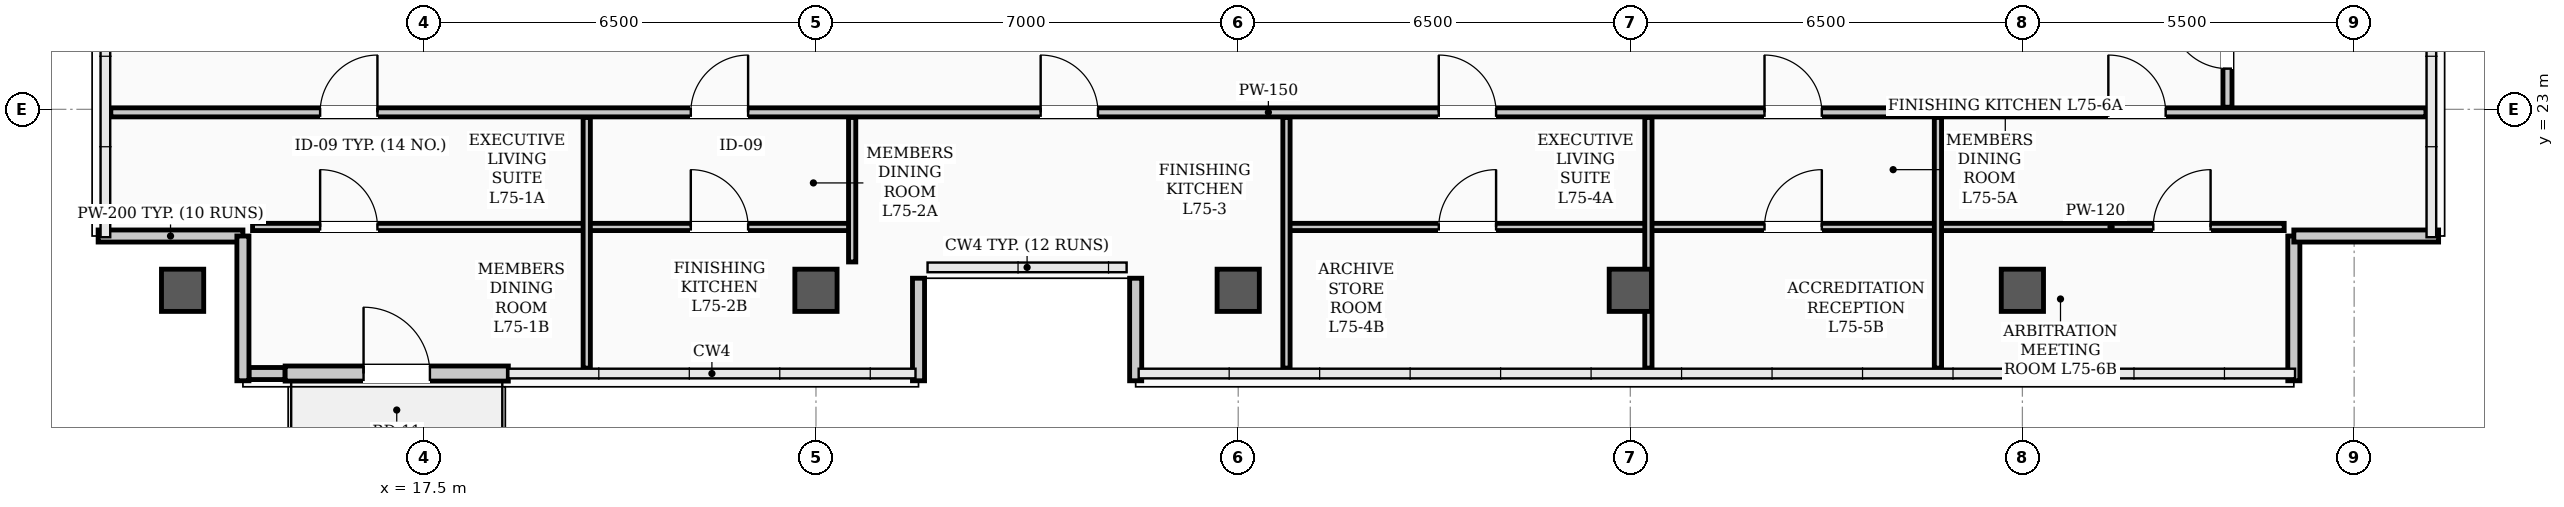
"""IFC4 building model, lengths in metres.
Left out: names, types, materials, properties, quantities, classifications, styles, units other than length and angle.
Written with IfcOpenShell. Run it as: python <this file> out.ifc"""

import sys

from ifc_helpers import new_model, si_unit, direction, frame, frame_2d, origin, origin_2d, place, context, subcontext, project, spatial, rectangle, hollow_rectangle, extrude, element, fill, save


model = new_model("IFC4")
c1 = context("Model", 3, precision=1e-05, world=origin(), true_north=direction((0.0, 1.0)))
c2 = subcontext(c1, "Body", "Model", "MODEL_VIEW")
j1 = project(units=[si_unit("LENGTHUNIT", "METRE"), si_unit("PLANEANGLEUNIT", "RADIAN")], contexts=[c1])
p1 = place(None, origin())
s1 = spatial("IfcSite", under=j1, at=p1, CompositionType="ELEMENT")
p2 = place(p1, origin())
s2 = spatial("IfcBuilding", under=s1, at=p2, CompositionType="ELEMENT")
p3 = place(p2, frame((0.0, 0.0, 300.8)))
s3 = spatial("IfcBuildingStorey", under=s2, at=p3, CompositionType="ELEMENT", Elevation=300.8)
for number, where, z_axis, x_axis in (
    (1, (13.5, 20.0, 0.0), (0.0, 0.0, 1.0), (1.0, 0.0, 0.0)),
    (2, (24.0, 20.0, 0.0), (0.0, 0.0, 1.0), (1.0, 0.0, 0.0)),
    (3, (31.0, 20.0, 0.0), (0.0, 0.0, 1.0), (1.0, 0.0, 0.0)),
    (4, (37.5, 20.0, 0.0), (0.0, 0.0, 1.0), (1.0, 0.0, 0.0)),
    (5, (44.0, 20.0, 0.0), (0.0, 0.0, 1.0), (1.0, 0.0, 0.0)),
):
    element("IfcColumn", number, at=place(p3, frame(where, z_axis=z_axis, x_axis=x_axis)), inside=s3, PredefinedType="COLUMN", context=c2, shape_type="SweptSolid", body=[
        extrude(hollow_rectangle(XDim=0.7, YDim=0.7, WallThickness=0.028, InnerFilletRadius=0.014, OuterFilletRadius=0.042, at=origin_2d()), origin(), (0.0, 0.0, 1.0), 5.2),
    ])
p4 = place(p3, frame((14.6, 18.62, 0.0), z_axis=(0.0, 0.0, 1.0), x_axis=(1.0, 0.0, 0.0)))
e6 = element("IfcWall", 6, at=p4, inside=s3, PredefinedType="PARAPET", context=c2, shape_type="SweptSolid", body=[
    extrude(rectangle(XDim=0.6, YDim=0.2, at=frame_2d((0.3, 0.0))), origin(), (0.0, 0.0, 1.0), 1.2),
])
for number, where, z_axis, x_axis in (
    (7, (12.1, 20.9, 0.0), (0.0, 0.0, 1.0), (1.0, 0.0, 0.0)),
    (8, (14.5, 20.9, 0.0), (0.0, 0.0, 1.0), (0.0, -1.0, 0.0)),
    (9, (48.5, 18.5, 0.0), (0.0, 0.0, 1.0), (0.0, 1.0, 0.0)),
    (10, (48.5, 20.9, 0.0), (0.0, 0.0, 1.0), (1.0, 0.0, 0.0)),
):
    element("IfcWall", number, at=place(p3, frame(where, z_axis=z_axis, x_axis=x_axis)), inside=s3, PredefinedType="PARAPET", context=c2, shape_type="SweptSolid", body=[
        extrude(rectangle(XDim=2.4, YDim=0.2, at=frame_2d((1.2, 0.0))), origin(), (0.0, 0.0, 1.0), 1.2),
    ])
for number, where, z_axis, x_axis in (
    (11, (25.7, 18.5, 0.0), (0.0, 0.0, 1.0), (0.0, 1.0, 0.0)),
    (12, (29.3, 20.2, 0.0), (0.0, 0.0, 1.0), (0.0, -1.0, 0.0)),
):
    element("IfcWall", number, at=place(p3, frame(where, z_axis=z_axis, x_axis=x_axis)), inside=s3, PredefinedType="PARAPET", context=c2, shape_type="SweptSolid", body=[
        extrude(rectangle(XDim=1.7, YDim=0.2, at=frame_2d((0.85, 0.0))), origin(), (0.0, 0.0, 1.0), 1.2),
    ])
p5 = place(p3, frame((15.2, 18.62, 0.0), z_axis=(0.0, 0.0, 1.0), x_axis=(1.0, 0.0, 0.0)))
e13 = element("IfcWall", 13, at=p5, inside=s3, PredefinedType="STANDARD", context=c2, shape_type="SweptSolid", body=[
    extrude(rectangle(XDim=3.7, YDim=0.25, at=frame_2d((1.85, 0.0))), origin(), (0.0, 0.0, 1.0), 3.46),
])
p6 = place(p5, frame((1.3, 0.0, 0.0)))
e14 = element("IfcOpeningElement", 14, at=p6, cuts=e13, PredefinedType="OPENING", context=c2, shape_type="SweptSolid", body=[
    extrude(rectangle(XDim=1.1, YDim=2.2, at=frame_2d((0.55, 1.1))), frame((0.0, 0.135, 0.0), z_axis=(0.0, -1.0, 0.0), x_axis=(1.0, 0.0, 0.0)), (0.0, 0.0, 1.0), 0.27),
])
p7 = place(p3, frame((12.31, 22.95, 0.0), z_axis=(0.0, 0.0, 1.0), x_axis=(1.0, 0.0, 0.0)))
e15 = element("IfcWall", 15, at=p7, inside=s3, PredefinedType="PARTITIONING", context=c2, shape_type="SweptSolid", body=[
    extrude(rectangle(XDim=38.38, YDim=0.15, at=frame_2d((19.19, 0.0))), origin(), (0.0, 0.0, 1.0), 3.48),
])
p8 = place(p7, frame((3.47, 0.0, 0.0)))
e16 = element("IfcOpeningElement", 16, at=p8, cuts=e15, PredefinedType="OPENING", context=c2, shape_type="SweptSolid", body=[
    extrude(rectangle(XDim=0.95, YDim=2.08, at=frame_2d((0.475, 1.04))), frame((0.0, 0.085, 0.0), z_axis=(0.0, -1.0, 0.0), x_axis=(1.0, 0.0, 0.0)), (0.0, 0.0, 1.0), 0.17),
])
p9 = place(p7, frame((9.615, 0.0, 0.0)))
e17 = element("IfcOpeningElement", 17, at=p9, cuts=e15, PredefinedType="OPENING", context=c2, shape_type="SweptSolid", body=[
    extrude(rectangle(XDim=0.95, YDim=2.08, at=frame_2d((0.475, 1.04))), frame((0.0, 0.085, 0.0), z_axis=(0.0, -1.0, 0.0), x_axis=(1.0, 0.0, 0.0)), (0.0, 0.0, 1.0), 0.17),
])
p10 = place(p7, frame((15.415, 0.0, 0.0)))
e18 = element("IfcOpeningElement", 18, at=p10, cuts=e15, PredefinedType="OPENING", context=c2, shape_type="SweptSolid", body=[
    extrude(rectangle(XDim=0.95, YDim=2.08, at=frame_2d((0.475, 1.04))), frame((0.0, 0.085, 0.0), z_axis=(0.0, -1.0, 0.0), x_axis=(1.0, 0.0, 0.0)), (0.0, 0.0, 1.0), 0.17),
])
p11 = place(p7, frame((22.015, 0.0, 0.0)))
e19 = element("IfcOpeningElement", 19, at=p11, cuts=e15, PredefinedType="OPENING", context=c2, shape_type="SweptSolid", body=[
    extrude(rectangle(XDim=0.95, YDim=2.08, at=frame_2d((0.475, 1.04))), frame((0.0, 0.085, 0.0), z_axis=(0.0, -1.0, 0.0), x_axis=(1.0, 0.0, 0.0)), (0.0, 0.0, 1.0), 0.17),
])
p12 = place(p7, frame((27.415, 0.0, 0.0)))
e20 = element("IfcOpeningElement", 20, at=p12, cuts=e15, PredefinedType="OPENING", context=c2, shape_type="SweptSolid", body=[
    extrude(rectangle(XDim=0.95, YDim=2.08, at=frame_2d((0.475, 1.04))), frame((0.0, 0.085, 0.0), z_axis=(0.0, -1.0, 0.0), x_axis=(1.0, 0.0, 0.0)), (0.0, 0.0, 1.0), 0.17),
])
p13 = place(p7, frame((33.115, 0.0, 0.0)))
e21 = element("IfcOpeningElement", 21, at=p13, cuts=e15, PredefinedType="OPENING", context=c2, shape_type="SweptSolid", body=[
    extrude(rectangle(XDim=0.95, YDim=2.08, at=frame_2d((0.475, 1.04))), frame((0.0, 0.085, 0.0), z_axis=(0.0, -1.0, 0.0), x_axis=(1.0, 0.0, 0.0)), (0.0, 0.0, 1.0), 0.17),
])
p14 = place(p3, frame((14.66, 21.05, 0.0), z_axis=(0.0, 0.0, 1.0), x_axis=(1.0, 0.0, 0.0)))
e22 = element("IfcWall", 22, at=p14, inside=s3, PredefinedType="PARTITIONING", context=c2, shape_type="SweptSolid", body=[
    extrude(rectangle(XDim=5.54, YDim=0.12, at=frame_2d((2.77, 0.0))), origin(), (0.0, 0.0, 1.0), 4.9),
])
p15 = place(p14, frame((1.12, 0.0, 0.0)))
e23 = element("IfcOpeningElement", 23, at=p15, cuts=e22, PredefinedType="OPENING", context=c2, shape_type="SweptSolid", body=[
    extrude(rectangle(XDim=0.95, YDim=2.08, at=frame_2d((0.475, 1.04))), frame((0.0, 0.07, 0.0), z_axis=(0.0, -1.0, 0.0), x_axis=(1.0, 0.0, 0.0)), (0.0, 0.0, 1.0), 0.14),
])
p16 = place(p3, frame((20.2, 21.05, 0.0), z_axis=(0.0, 0.0, 1.0), x_axis=(1.0, 0.0, 0.0)))
e24 = element("IfcWall", 24, at=p16, inside=s3, PredefinedType="PARTITIONING", context=c2, shape_type="SweptSolid", body=[
    extrude(rectangle(XDim=4.4, YDim=0.12, at=frame_2d((2.2, 0.0))), origin(), (0.0, 0.0, 1.0), 3.48),
])
p17 = place(p16, frame((1.725, 0.0, 0.0)))
e25 = element("IfcOpeningElement", 25, at=p17, cuts=e24, PredefinedType="OPENING", context=c2, shape_type="SweptSolid", body=[
    extrude(rectangle(XDim=0.95, YDim=2.08, at=frame_2d((0.475, 1.04))), frame((0.0, 0.07, 0.0), z_axis=(0.0, -1.0, 0.0), x_axis=(1.0, 0.0, 0.0)), (0.0, 0.0, 1.0), 0.14),
])
p18 = place(p3, frame((31.8, 21.05, 0.0), z_axis=(0.0, 0.0, 1.0), x_axis=(1.0, 0.0, 0.0)))
e26 = element("IfcWall", 26, at=p18, inside=s3, PredefinedType="PARTITIONING", context=c2, shape_type="SweptSolid", body=[
    extrude(rectangle(XDim=6.0, YDim=0.12, at=frame_2d((3.0, 0.0))), origin(), (0.0, 0.0, 1.0), 3.48),
])
p19 = place(p18, frame((2.525, 0.0, 0.0)))
e27 = element("IfcOpeningElement", 27, at=p19, cuts=e26, PredefinedType="OPENING", context=c2, shape_type="SweptSolid", body=[
    extrude(rectangle(XDim=0.95, YDim=2.08, at=frame_2d((0.475, 1.04))), frame((0.0, 0.07, 0.0), z_axis=(0.0, -1.0, 0.0), x_axis=(1.0, 0.0, 0.0)), (0.0, 0.0, 1.0), 0.14),
])
p20 = place(p3, frame((37.8, 21.05, 0.0), z_axis=(0.0, 0.0, 1.0), x_axis=(1.0, 0.0, 0.0)))
e28 = element("IfcWall", 28, at=p20, inside=s3, PredefinedType="PARTITIONING", context=c2, shape_type="SweptSolid", body=[
    extrude(rectangle(XDim=4.8, YDim=0.12, at=frame_2d((2.4, 0.0))), origin(), (0.0, 0.0, 1.0), 3.48),
])
p21 = place(p20, frame((1.925, 0.0, 0.0)))
e29 = element("IfcOpeningElement", 29, at=p21, cuts=e28, PredefinedType="OPENING", context=c2, shape_type="SweptSolid", body=[
    extrude(rectangle(XDim=0.95, YDim=2.08, at=frame_2d((0.475, 1.04))), frame((0.0, 0.07, 0.0), z_axis=(0.0, -1.0, 0.0), x_axis=(1.0, 0.0, 0.0)), (0.0, 0.0, 1.0), 0.14),
])
p22 = place(p3, frame((42.6, 21.05, 0.0), z_axis=(0.0, 0.0, 1.0), x_axis=(1.0, 0.0, 0.0)))
e30 = element("IfcWall", 30, at=p22, inside=s3, PredefinedType="PARTITIONING", context=c2, shape_type="SweptSolid", body=[
    extrude(rectangle(XDim=5.74, YDim=0.12, at=frame_2d((2.87, 0.0))), origin(), (0.0, 0.0, 1.0), 3.48),
])
p23 = place(p22, frame((3.57, 0.0, 0.0)))
e31 = element("IfcOpeningElement", 31, at=p23, cuts=e30, PredefinedType="OPENING", context=c2, shape_type="SweptSolid", body=[
    extrude(rectangle(XDim=0.95, YDim=2.08, at=frame_2d((0.475, 1.04))), frame((0.0, 0.07, 0.0), z_axis=(0.0, -1.0, 0.0), x_axis=(1.0, 0.0, 0.0)), (0.0, 0.0, 1.0), 0.14),
])
p24 = place(p3, frame((47.4, 23.035, 0.0), z_axis=(0.0, 0.0, 1.0), x_axis=(0.0, 1.0, 0.0)))
e32 = element("IfcWall", 32, at=p24, inside=s3, PredefinedType="PARTITIONING", context=c2, shape_type="SweptSolid", body=[
    extrude(rectangle(XDim=18.63, YDim=0.15, at=frame_2d((9.315, 0.0))), origin(), (0.0, 0.0, 1.0), 3.48),
])
p25 = place(p24, frame((0.64, 0.0, 0.0)))
e33 = element("IfcOpeningElement", 33, at=p25, cuts=e32, PredefinedType="OPENING", context=c2, shape_type="SweptSolid", body=[
    extrude(rectangle(XDim=0.95, YDim=2.08, at=frame_2d((0.475, 1.04))), frame((0.0, 0.085, 0.0), z_axis=(0.0, -1.0, 0.0), x_axis=(1.0, 0.0, 0.0)), (0.0, 0.0, 1.0), 0.17),
])
p26 = place(p24, frame((10.59, 0.0, 0.0)))
e34 = element("IfcOpeningElement", 34, at=p26, cuts=e32, PredefinedType="OPENING", context=c2, shape_type="SweptSolid", body=[
    extrude(rectangle(XDim=0.95, YDim=2.08, at=frame_2d((0.475, 1.04))), frame((0.0, 0.085, 0.0), z_axis=(0.0, -1.0, 0.0), x_axis=(1.0, 0.0, 0.0)), (0.0, 0.0, 1.0), 0.17),
])
p27 = place(p24, frame((15.365, 0.0, 0.0)))
e35 = element("IfcOpeningElement", 35, at=p27, cuts=e32, PredefinedType="OPENING", context=c2, shape_type="SweptSolid", body=[
    extrude(rectangle(XDim=0.95, YDim=2.08, at=frame_2d((0.475, 1.04))), frame((0.0, 0.085, 0.0), z_axis=(0.0, -1.0, 0.0), x_axis=(1.0, 0.0, 0.0)), (0.0, 0.0, 1.0), 0.17),
])
p28 = place(p3, frame((20.2, 18.71, 0.0), z_axis=(0.0, 0.0, 1.0), x_axis=(0.0, 1.0, 0.0)))
e36 = element("IfcWall", 36, at=p28, inside=s3, PredefinedType="PARTITIONING", context=c2, shape_type="SweptSolid", body=[
    extrude(rectangle(XDim=4.155, YDim=0.12, at=frame_2d((2.078, 0.0))), origin(), (0.0, 0.0, 1.0), 4.9),
])
p29 = place(p3, frame((24.6, 20.47, 0.0), z_axis=(0.0, 0.0, 1.0), x_axis=(0.0, 1.0, 0.0)))
e37 = element("IfcWall", 37, at=p29, inside=s3, PredefinedType="PARTITIONING", context=c2, shape_type="SweptSolid", body=[
    extrude(rectangle(XDim=2.395, YDim=0.12, at=frame_2d((1.198, 0.0))), origin(), (0.0, 0.0, 1.0), 3.48),
])
for number, where, z_axis, x_axis in (
    (38, (31.8, 18.71, 0.0), (0.0, 0.0, 1.0), (0.0, 1.0, 0.0)),
    (39, (37.8, 18.71, 0.0), (0.0, 0.0, 1.0), (0.0, 1.0, 0.0)),
    (40, (42.6, 18.71, 0.0), (0.0, 0.0, 1.0), (0.0, 1.0, 0.0)),
):
    element("IfcWall", number, at=place(p3, frame(where, z_axis=z_axis, x_axis=x_axis)), inside=s3, PredefinedType="PARTITIONING", context=c2, shape_type="SweptSolid", body=[
        extrude(rectangle(XDim=4.155, YDim=0.12, at=frame_2d((2.078, 0.0))), origin(), (0.0, 0.0, 1.0), 3.48),
    ])
p30 = place(p6, origin())
e41 = element("IfcDoor", 41, at=p30, inside=s3, OperationType="SINGLE_SWING_LEFT", PredefinedType="DOOR", context=c2, shape_type="SweptSolid", body=[
    extrude(rectangle(XDim=1.1, YDim=2.2, at=frame_2d((0.55, 1.1))), frame((0.0, 0.025, 0.0), z_axis=(0.0, -1.0, 0.0), x_axis=(1.0, 0.0, 0.0)), (0.0, 0.0, 1.0), 0.05),
])
fill(e14, e41)
p31 = place(p15, origin())
e42 = element("IfcDoor", 42, at=p31, inside=s3, OperationType="SINGLE_SWING_LEFT", PredefinedType="DOOR", context=c2, shape_type="SweptSolid", body=[
    extrude(rectangle(XDim=0.95, YDim=2.08, at=frame_2d((0.475, 1.04))), frame((0.0, 0.025, 0.0), z_axis=(0.0, -1.0, 0.0), x_axis=(1.0, 0.0, 0.0)), (0.0, 0.0, 1.0), 0.05),
])
fill(e23, e42)
p32 = place(p8, origin())
e43 = element("IfcDoor", 43, at=p32, inside=s3, OperationType="SINGLE_SWING_RIGHT", PredefinedType="DOOR", context=c2, shape_type="SweptSolid", body=[
    extrude(rectangle(XDim=0.95, YDim=2.08, at=frame_2d((0.475, 1.04))), frame((0.0, 0.025, 0.0), z_axis=(0.0, -1.0, 0.0), x_axis=(1.0, 0.0, 0.0)), (0.0, 0.0, 1.0), 0.05),
])
fill(e16, e43)
p33 = place(p17, origin())
e44 = element("IfcDoor", 44, at=p33, inside=s3, OperationType="SINGLE_SWING_LEFT", PredefinedType="DOOR", context=c2, shape_type="SweptSolid", body=[
    extrude(rectangle(XDim=0.95, YDim=2.08, at=frame_2d((0.475, 1.04))), frame((0.0, 0.025, 0.0), z_axis=(0.0, -1.0, 0.0), x_axis=(1.0, 0.0, 0.0)), (0.0, 0.0, 1.0), 0.05),
])
fill(e25, e44)
p34 = place(p9, origin())
e45 = element("IfcDoor", 45, at=p34, inside=s3, OperationType="SINGLE_SWING_RIGHT", PredefinedType="DOOR", context=c2, shape_type="SweptSolid", body=[
    extrude(rectangle(XDim=0.95, YDim=2.08, at=frame_2d((0.475, 1.04))), frame((0.0, 0.025, 0.0), z_axis=(0.0, -1.0, 0.0), x_axis=(1.0, 0.0, 0.0)), (0.0, 0.0, 1.0), 0.05),
])
fill(e17, e45)
p35 = place(p10, origin())
e46 = element("IfcDoor", 46, at=p35, inside=s3, OperationType="SINGLE_SWING_LEFT", PredefinedType="DOOR", context=c2, shape_type="SweptSolid", body=[
    extrude(rectangle(XDim=0.95, YDim=2.08, at=frame_2d((0.475, 1.04))), frame((0.0, 0.025, 0.0), z_axis=(0.0, -1.0, 0.0), x_axis=(1.0, 0.0, 0.0)), (0.0, 0.0, 1.0), 0.05),
])
fill(e18, e46)
p36 = place(p19, origin())
e47 = element("IfcDoor", 47, at=p36, inside=s3, OperationType="SINGLE_SWING_RIGHT", PredefinedType="DOOR", context=c2, shape_type="SweptSolid", body=[
    extrude(rectangle(XDim=0.95, YDim=2.08, at=frame_2d((0.475, 1.04))), frame((0.0, 0.025, 0.0), z_axis=(0.0, -1.0, 0.0), x_axis=(1.0, 0.0, 0.0)), (0.0, 0.0, 1.0), 0.05),
])
fill(e27, e47)
p37 = place(p11, origin())
e48 = element("IfcDoor", 48, at=p37, inside=s3, OperationType="SINGLE_SWING_LEFT", PredefinedType="DOOR", context=c2, shape_type="SweptSolid", body=[
    extrude(rectangle(XDim=0.95, YDim=2.08, at=frame_2d((0.475, 1.04))), frame((0.0, 0.025, 0.0), z_axis=(0.0, -1.0, 0.0), x_axis=(1.0, 0.0, 0.0)), (0.0, 0.0, 1.0), 0.05),
])
fill(e19, e48)
p38 = place(p21, origin())
e49 = element("IfcDoor", 49, at=p38, inside=s3, OperationType="SINGLE_SWING_RIGHT", PredefinedType="DOOR", context=c2, shape_type="SweptSolid", body=[
    extrude(rectangle(XDim=0.95, YDim=2.08, at=frame_2d((0.475, 1.04))), frame((0.0, 0.025, 0.0), z_axis=(0.0, -1.0, 0.0), x_axis=(1.0, 0.0, 0.0)), (0.0, 0.0, 1.0), 0.05),
])
fill(e29, e49)
p39 = place(p12, origin())
e50 = element("IfcDoor", 50, at=p39, inside=s3, OperationType="SINGLE_SWING_LEFT", PredefinedType="DOOR", context=c2, shape_type="SweptSolid", body=[
    extrude(rectangle(XDim=0.95, YDim=2.08, at=frame_2d((0.475, 1.04))), frame((0.0, 0.025, 0.0), z_axis=(0.0, -1.0, 0.0), x_axis=(1.0, 0.0, 0.0)), (0.0, 0.0, 1.0), 0.05),
])
fill(e20, e50)
p40 = place(p23, origin())
e51 = element("IfcDoor", 51, at=p40, inside=s3, OperationType="SINGLE_SWING_RIGHT", PredefinedType="DOOR", context=c2, shape_type="SweptSolid", body=[
    extrude(rectangle(XDim=0.95, YDim=2.08, at=frame_2d((0.475, 1.04))), frame((0.0, 0.025, 0.0), z_axis=(0.0, -1.0, 0.0), x_axis=(1.0, 0.0, 0.0)), (0.0, 0.0, 1.0), 0.05),
])
fill(e31, e51)
p41 = place(p13, origin())
e52 = element("IfcDoor", 52, at=p41, inside=s3, OperationType="SINGLE_SWING_LEFT", PredefinedType="DOOR", context=c2, shape_type="SweptSolid", body=[
    extrude(rectangle(XDim=0.95, YDim=2.08, at=frame_2d((0.475, 1.04))), frame((0.0, 0.025, 0.0), z_axis=(0.0, -1.0, 0.0), x_axis=(1.0, 0.0, 0.0)), (0.0, 0.0, 1.0), 0.05),
])
fill(e21, e52)
p42 = place(p25, origin())
e53 = element("IfcDoor", 53, at=p42, inside=s3, OperationType="SINGLE_SWING_RIGHT", PredefinedType="DOOR", context=c2, shape_type="SweptSolid", body=[
    extrude(rectangle(XDim=0.95, YDim=2.08, at=frame_2d((0.475, 1.04))), frame((0.0, 0.025, 0.0), z_axis=(0.0, -1.0, 0.0), x_axis=(1.0, 0.0, 0.0)), (0.0, 0.0, 1.0), 0.05),
])
fill(e33, e53)
save(model, sys.argv[1])
